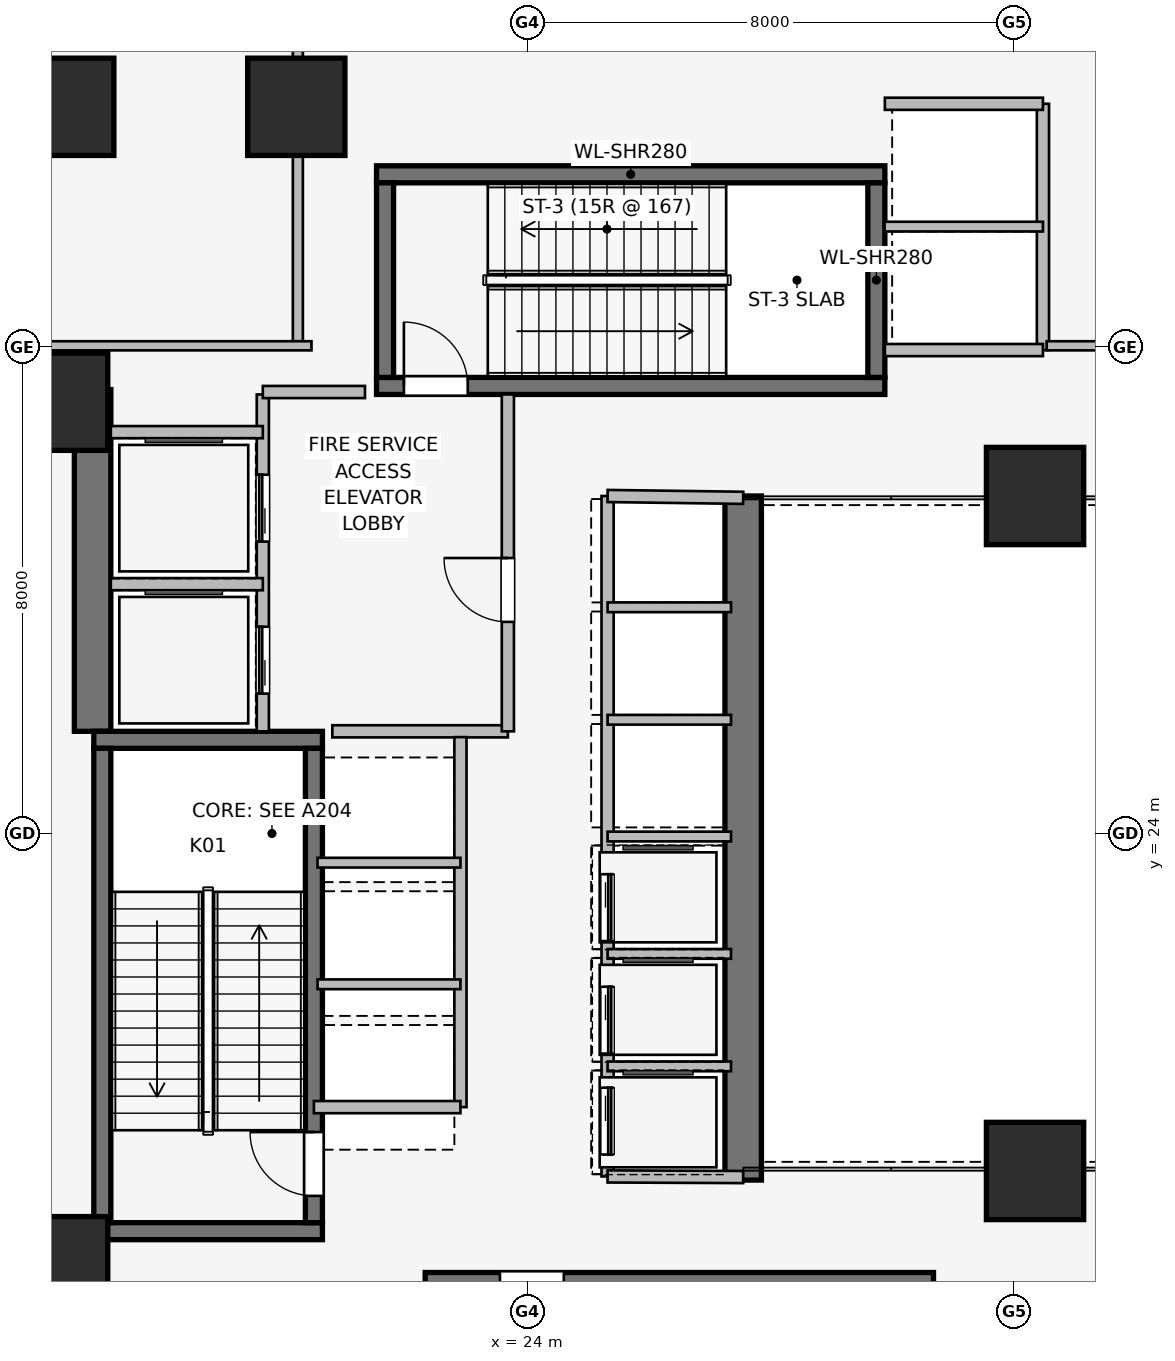
"""IFC4 building model, lengths in metres.
Left out: names, types, materials, properties, quantities, classifications, styles, units other than length and angle.
Written with IfcOpenShell. Run it as: python <this file> out.ifc"""

import sys

from ifc_helpers import new_model, si_unit, direction, frame, frame_2d, origin, origin_2d, place, context, subcontext, project, spatial, rectangle, extrude, element, fill, save


model = new_model("IFC4")
c1 = context("Model", 3, precision=1e-05, world=origin(), true_north=direction((0.0, 1.0)))
c2 = subcontext(c1, "Body", "Model", "MODEL_VIEW")
j1 = project(units=[si_unit("LENGTHUNIT", "METRE"), si_unit("PLANEANGLEUNIT", "RADIAN")], contexts=[c1])
p1 = place(None, origin())
s1 = spatial("IfcSite", under=j1, at=p1, CompositionType="ELEMENT")
p2 = place(p1, origin())
s2 = spatial("IfcBuilding", under=s1, at=p2, CompositionType="ELEMENT")
p3 = place(p2, frame((0.0, 0.0, 6.0)))
s3 = spatial("IfcBuildingStorey", under=s2, at=p3, CompositionType="ELEMENT", Elevation=6.0)
p4 = place(p3, frame((16.85, 25.68, 0.0), z_axis=(0.0, 0.0, 1.0), x_axis=(0.0, 1.0, 0.0)))
e1 = element("IfcWall", 1, at=p4, inside=s3, PredefinedType="SHEAR", context=c2, shape_type="SweptSolid", body=[
    extrude(rectangle(XDim=5.62, YDim=0.6, at=frame_2d((2.81, 0.0))), origin(), (0.0, 0.0, 1.0), 5.0),
])
p5 = place(p3, frame((27.55, 29.55, 0.0), z_axis=(0.0, 0.0, 1.0), x_axis=(0.0, -1.0, 0.0)))
e2 = element("IfcWall", 2, at=p5, inside=s3, PredefinedType="SHEAR", context=c2, shape_type="SweptSolid", body=[
    extrude(rectangle(XDim=11.25, YDim=0.6, at=frame_2d((5.625, 0.0))), origin(), (0.0, 0.0, 1.0), 5.0),
])
for number, where, z_axis, x_axis in (
    (3, (16.87, 17.46, 0.0), (0.0, 0.0, 1.0), (1.0, 0.0, 0.0)),
    (4, (20.63, 25.54, 0.0), (0.0, 0.0, 1.0), (-1.0, 0.0, 0.0)),
):
    element("IfcWall", number, at=place(p3, frame(where, z_axis=z_axis, x_axis=x_axis)), inside=s3, PredefinedType="SHEAR", context=c2, shape_type="SweptSolid", body=[
        extrude(rectangle(XDim=3.76, YDim=0.28, at=frame_2d((1.88, 0.0))), origin(), (0.0, 0.0, 1.0), 5.0),
    ])
p6 = place(p3, frame((17.01, 25.4, 0.0), z_axis=(0.0, 0.0, 1.0), x_axis=(0.0, -1.0, 0.0)))
e5 = element("IfcWall", 5, at=p6, inside=s3, PredefinedType="SHEAR", context=c2, shape_type="SweptSolid", body=[
    extrude(rectangle(XDim=7.8, YDim=0.28, at=frame_2d((3.9, 0.0))), origin(), (0.0, 0.0, 1.0), 5.0),
])
p7 = place(p3, frame((20.49, 17.6, 0.0), z_axis=(0.0, 0.0, 1.0), x_axis=(0.0, 1.0, 0.0)))
e6 = element("IfcWall", 6, at=p7, inside=s3, PredefinedType="SHEAR", context=c2, shape_type="SweptSolid", body=[
    extrude(rectangle(XDim=7.8, YDim=0.28, at=frame_2d((3.9, 0.0))), origin(), (0.0, 0.0, 1.0), 5.0),
])
p8 = place(p7, frame((0.44, 0.0, 0.0)))
e7 = element("IfcOpeningElement", 7, at=p8, cuts=e6, PredefinedType="OPENING", context=c2, shape_type="SweptSolid", body=[
    extrude(rectangle(XDim=1.05, YDim=2.0, at=frame_2d((0.525, 1.0))), frame((0.0, 0.15, 0.0), z_axis=(0.0, -1.0, 0.0), x_axis=(1.0, 0.0, 0.0)), (0.0, 0.0, 1.0), 0.3),
])
p9 = place(p3, frame((30.68, 16.64, 0.0), z_axis=(0.0, 0.0, 1.0), x_axis=(-1.0, 0.0, 0.0)))
e8 = element("IfcWall", 8, at=p9, inside=s3, PredefinedType="SHEAR", context=c2, shape_type="SweptSolid", body=[
    extrude(rectangle(XDim=8.36, YDim=0.28, at=frame_2d((4.18, 0.0))), origin(), (0.0, 0.0, 1.0), 5.0),
])
p10 = place(p9, frame((6.08, 0.0, 0.0)))
e9 = element("IfcOpeningElement", 9, at=p10, cuts=e8, PredefinedType="OPENING", context=c2, shape_type="SweptSolid", body=[
    extrude(rectangle(XDim=1.05, YDim=2.0, at=frame_2d((0.525, 1.0))), frame((0.0, 0.15, 0.0), z_axis=(0.0, -1.0, 0.0), x_axis=(1.0, 0.0, 0.0)), (0.0, 0.0, 1.0), 0.3),
])
p11 = place(p3, frame((21.52, 31.36, 0.0), z_axis=(0.0, 0.0, 1.0), x_axis=(1.0, 0.0, 0.0)))
e10 = element("IfcWall", 10, at=p11, inside=s3, PredefinedType="SHEAR", context=c2, shape_type="SweptSolid", body=[
    extrude(rectangle(XDim=8.36, YDim=0.28, at=frame_2d((4.18, 0.0))), origin(), (0.0, 0.0, 1.0), 5.0),
])
p12 = place(p11, frame((0.45, 0.0, 0.0)))
e11 = element("IfcOpeningElement", 11, at=p12, cuts=e10, PredefinedType="OPENING", context=c2, shape_type="SweptSolid", body=[
    extrude(rectangle(XDim=1.05, YDim=2.0, at=frame_2d((0.525, 1.0))), frame((0.0, 0.15, 0.0), z_axis=(0.0, -1.0, 0.0), x_axis=(1.0, 0.0, 0.0)), (0.0, 0.0, 1.0), 0.3),
])
p13 = place(p3, frame((29.88, 34.84, 0.0), z_axis=(0.0, 0.0, 1.0), x_axis=(-1.0, 0.0, 0.0)))
e12 = element("IfcWall", 12, at=p13, inside=s3, PredefinedType="SHEAR", context=c2, shape_type="SweptSolid", body=[
    extrude(rectangle(XDim=8.36, YDim=0.28, at=frame_2d((4.18, 0.0))), origin(), (0.0, 0.0, 1.0), 5.0),
])
for number, where, z_axis, x_axis in (
    (13, (21.66, 34.7, 0.0), (0.0, 0.0, 1.0), (0.0, -1.0, 0.0)),
    (14, (29.74, 31.5, 0.0), (0.0, 0.0, 1.0), (0.0, 1.0, 0.0)),
):
    element("IfcWall", number, at=place(p3, frame(where, z_axis=z_axis, x_axis=x_axis)), inside=s3, PredefinedType="SHEAR", context=c2, shape_type="SweptSolid", body=[
        extrude(rectangle(XDim=3.2, YDim=0.28, at=frame_2d((1.6, 0.0))), origin(), (0.0, 0.0, 1.0), 5.0),
    ])
for number, where, z_axis, x_axis in (
    (15, (16.3, 16.9, 0.0), (0.0, 0.0, 1.0), (1.0, 0.0, 0.0)),
    (16, (16.3, 31.1, 0.0), (0.0, 0.0, 1.0), (1.0, 0.0, 0.0)),
    (17, (32.35, 18.45, 0.0), (0.0, 0.0, 1.0), (1.0, 0.0, 0.0)),
    (18, (32.35, 29.55, 0.0), (0.0, 0.0, 1.0), (1.0, 0.0, 0.0)),
    (19, (20.2, 35.95, 0.0), (0.0, 0.0, 1.0), (1.0, 0.0, 0.0)),
    (20, (16.4, 35.95, 0.0), (0.0, 0.0, 1.0), (1.0, 0.0, 0.0)),
):
    element("IfcColumn", number, at=place(p3, frame(where, z_axis=z_axis, x_axis=x_axis)), inside=s3, PredefinedType="COLUMN", context=c2, shape_type="SweptSolid", body=[
        extrude(rectangle(XDim=1.6, YDim=1.6, at=origin_2d()), origin(), (0.0, 0.0, 1.0), 5.0),
    ])
p14 = place(p3, frame((19.65, 25.68, 0.0), z_axis=(0.0, 0.0, 1.0), x_axis=(0.0, 1.0, 0.0)))
e21 = element("IfcWall", 21, at=p14, inside=s3, PredefinedType="PARTITIONING", context=c2, shape_type="SweptSolid", body=[
    extrude(rectangle(XDim=5.54, YDim=0.2, at=frame_2d((2.77, 0.0))), origin(), (0.0, 0.0, 1.0), 4.69),
])
p15 = place(p14, frame((0.62, 0.0, 0.0)))
e22 = element("IfcOpeningElement", 22, at=p15, cuts=e21, PredefinedType="OPENING", context=c2, shape_type="SweptSolid", body=[
    extrude(rectangle(XDim=1.1, YDim=2.2, at=frame_2d((0.55, 1.1))), frame((0.0, 0.11, 0.0), z_axis=(0.0, -1.0, 0.0), x_axis=(1.0, 0.0, 0.0)), (0.0, 0.0, 1.0), 0.22),
])
p16 = place(p14, frame((3.12, 0.0, 0.0)))
e23 = element("IfcOpeningElement", 23, at=p16, cuts=e21, PredefinedType="OPENING", context=c2, shape_type="SweptSolid", body=[
    extrude(rectangle(XDim=1.1, YDim=2.2, at=frame_2d((0.55, 1.1))), frame((0.0, 0.11, 0.0), z_axis=(0.0, -1.0, 0.0), x_axis=(1.0, 0.0, 0.0)), (0.0, 0.0, 1.0), 0.22),
])
p17 = place(p3, frame((20.793, 25.68, 0.0), z_axis=(0.0, 0.0, 1.0), x_axis=(1.0, 0.0, 0.0)))
e24 = element("IfcWall", 24, at=p17, inside=s3, PredefinedType="PARTITIONING", context=c2, shape_type="SweptSolid", body=[
    extrude(rectangle(XDim=2.887, YDim=0.2, at=frame_2d((1.443, 0.0))), origin(), (0.0, 0.0, 1.0), 4.69),
])
p18 = place(p3, frame((23.68, 25.68, 0.0), z_axis=(0.0, 0.0, 1.0), x_axis=(0.0, 1.0, 0.0)))
e25 = element("IfcWall", 25, at=p18, inside=s3, PredefinedType="PARTITIONING", context=c2, shape_type="SweptSolid", body=[
    extrude(rectangle(XDim=5.54, YDim=0.2, at=frame_2d((2.77, 0.0))), origin(), (0.0, 0.0, 1.0), 4.69),
])
p19 = place(p18, frame((1.8, 0.0, 0.0)))
e26 = element("IfcOpeningElement", 26, at=p19, cuts=e25, PredefinedType="OPENING", context=c2, shape_type="SweptSolid", body=[
    extrude(rectangle(XDim=1.05, YDim=2.0, at=frame_2d((0.525, 1.0))), frame((0.0, 0.11, 0.0), z_axis=(0.0, -1.0, 0.0), x_axis=(1.0, 0.0, 0.0)), (0.0, 0.0, 1.0), 0.22),
])
p20 = place(p3, frame((21.33, 31.26, 0.0), z_axis=(0.0, 0.0, 1.0), x_axis=(-1.0, 0.0, 0.0)))
e27 = element("IfcWall", 27, at=p20, inside=s3, PredefinedType="PARTITIONING", context=c2, shape_type="SweptSolid", body=[
    extrude(rectangle(XDim=1.68, YDim=0.2, at=frame_2d((0.84, 0.0))), origin(), (0.0, 0.0, 1.0), 4.69),
])
p21 = place(p3, frame((17.15, 28.1, 0.0), z_axis=(0.0, 0.0, 1.0), x_axis=(1.0, 0.0, 0.0)))
e28 = element("IfcWall", 28, at=p21, inside=s3, PredefinedType="PARTITIONING", context=c2, shape_type="SweptSolid", body=[
    extrude(rectangle(XDim=2.5, YDim=0.2, at=frame_2d((1.25, 0.0))), origin(), (0.0, 0.0, 1.0), 4.69),
])
p22 = place(p3, frame((19.65, 30.6, 0.0), z_axis=(0.0, 0.0, 1.0), x_axis=(-1.0, 0.0, 0.0)))
e29 = element("IfcWall", 29, at=p22, inside=s3, PredefinedType="PARTITIONING", context=c2, shape_type="SweptSolid", body=[
    extrude(rectangle(XDim=2.5, YDim=0.2, at=frame_2d((1.25, 0.0))), origin(), (0.0, 0.0, 1.0), 3.59),
])
p23 = place(p3, frame((32.48, 31.95, 0.0), z_axis=(0.0, 0.0, 1.0), x_axis=(0.0, 1.0, 0.0)))
e30 = element("IfcWall", 30, at=p23, inside=s3, PredefinedType="PARTITIONING", context=c2, shape_type="SweptSolid", body=[
    extrude(rectangle(XDim=4.05, YDim=0.2, at=frame_2d((2.025, 0.0))), origin(), (0.0, 0.0, 1.0), 4.69),
])
p24 = place(p3, frame((29.88, 36.0, 0.0), z_axis=(0.0, 0.0, 1.0), x_axis=(1.0, 0.0, 0.0)))
e31 = element("IfcWall", 31, at=p24, inside=s3, PredefinedType="PARTITIONING", context=c2, shape_type="SweptSolid", body=[
    extrude(rectangle(XDim=2.6, YDim=0.2, at=frame_2d((1.3, 0.0))), origin(), (0.0, 0.0, 1.0), 3.742),
])
p25 = place(p3, frame((32.48, 31.95, 0.0), z_axis=(0.0, 0.0, 1.0), x_axis=(-1.0, 0.0, 0.0)))
e32 = element("IfcWall", 32, at=p25, inside=s3, PredefinedType="PARTITIONING", context=c2, shape_type="SweptSolid", body=[
    extrude(rectangle(XDim=2.6, YDim=0.2, at=frame_2d((1.3, 0.0))), origin(), (0.0, 0.0, 1.0), 4.69),
])
p26 = place(p3, frame((29.875, 33.98, 0.0), z_axis=(0.0, 0.0, 1.0), x_axis=(1.0, 0.0, 0.0)))
e33 = element("IfcWall", 33, at=p26, inside=s3, PredefinedType="PARTITIONING", context=c2, shape_type="SweptSolid", body=[
    extrude(rectangle(XDim=2.605, YDim=0.16, at=frame_2d((1.302, 0.0))), origin(), (0.0, 0.0, 1.0), 4.69),
])
p27 = place(p3, frame((22.9, 19.5, 0.0), z_axis=(0.0, 0.0, 1.0), x_axis=(0.0, 1.0, 0.0)))
e34 = element("IfcWall", 34, at=p27, inside=s3, PredefinedType="PARTITIONING", context=c2, shape_type="SweptSolid", body=[
    extrude(rectangle(XDim=6.085, YDim=0.2, at=frame_2d((3.042, 0.0))), origin(), (0.0, 0.0, 1.0), 4.69),
])
p28 = place(p3, frame((20.49, 19.5, 0.0), z_axis=(0.0, 0.0, 1.0), x_axis=(1.0, 0.0, 0.0)))
e35 = element("IfcWall", 35, at=p28, inside=s3, PredefinedType="PARTITIONING", context=c2, shape_type="SweptSolid", body=[
    extrude(rectangle(XDim=2.41, YDim=0.2, at=frame_2d((1.205, 0.0))), origin(), (0.0, 0.0, 1.0), 3.59),
])
for number, where, z_axis, x_axis in (
    (36, (20.55, 21.52, 0.0), (0.0, 0.0, 1.0), (1.0, 0.0, 0.0)),
    (37, (20.55, 23.52, 0.0), (0.0, 0.0, 1.0), (1.0, 0.0, 0.0)),
):
    element("IfcWall", number, at=place(p3, frame(where, z_axis=z_axis, x_axis=x_axis)), inside=s3, PredefinedType="PARTITIONING", context=c2, shape_type="SweptSolid", body=[
        extrude(rectangle(XDim=2.35, YDim=0.16, at=frame_2d((1.175, 0.0))), origin(), (0.0, 0.0, 1.0), 4.69),
    ])
p29 = place(p3, frame((25.32, 29.55, 0.0), z_axis=(0.0, 0.0, 1.0), x_axis=(0.0, -1.0, 0.0)))
e38 = element("IfcWall", 38, at=p29, inside=s3, PredefinedType="PARTITIONING", context=c2, shape_type="SweptSolid", body=[
    extrude(rectangle(XDim=11.19, YDim=0.2, at=frame_2d((5.595, 0.0))), origin(), (0.0, 0.0, 1.0), 4.69),
])
p30 = place(p29, frame((6.22, 0.0, 0.0)))
e39 = element("IfcOpeningElement", 39, at=p30, cuts=e38, PredefinedType="OPENING", context=c2, shape_type="SweptSolid", body=[
    extrude(rectangle(XDim=1.1, YDim=2.2, at=frame_2d((0.55, 1.1))), frame((0.0, 0.11, 0.0), z_axis=(0.0, -1.0, 0.0), x_axis=(1.0, 0.0, 0.0)), (0.0, 0.0, 1.0), 0.22),
])
p31 = place(p29, frame((8.07, 0.0, 0.0)))
e40 = element("IfcOpeningElement", 40, at=p31, cuts=e38, PredefinedType="OPENING", context=c2, shape_type="SweptSolid", body=[
    extrude(rectangle(XDim=1.1, YDim=2.2, at=frame_2d((0.55, 1.1))), frame((0.0, 0.11, 0.0), z_axis=(0.0, -1.0, 0.0), x_axis=(1.0, 0.0, 0.0)), (0.0, 0.0, 1.0), 0.22),
])
p32 = place(p29, frame((9.73, 0.0, 0.0)))
e41 = element("IfcOpeningElement", 41, at=p32, cuts=e38, PredefinedType="OPENING", context=c2, shape_type="SweptSolid", body=[
    extrude(rectangle(XDim=1.1, YDim=2.2, at=frame_2d((0.55, 1.1))), frame((0.0, 0.11, 0.0), z_axis=(0.0, -1.0, 0.0), x_axis=(1.0, 0.0, 0.0)), (0.0, 0.0, 1.0), 0.22),
])
p33 = place(p3, frame((25.32, 18.36, 0.0), z_axis=(0.0, 0.0, 1.0), x_axis=(0.999989925833, -0.004488678231, 0.0)))
e42 = element("IfcWall", 42, at=p33, inside=s3, PredefinedType="PARTITIONING", context=c2, shape_type="SweptSolid", body=[
    extrude(rectangle(XDim=2.23, YDim=0.2, at=frame_2d((1.115, 0.0))), origin(), (0.0, 0.0, 1.0), 4.69),
])
p34 = place(p3, frame((27.55, 29.52, 0.0), z_axis=(0.0, 0.0, 1.0), x_axis=(-0.999909343457, 0.013464949556, 0.0)))
e43 = element("IfcWall", 43, at=p34, inside=s3, PredefinedType="PARTITIONING", context=c2, shape_type="SweptSolid", body=[
    extrude(rectangle(XDim=2.23, YDim=0.2, at=frame_2d((1.115, 0.0))), origin(), (0.0, 0.0, 1.0), 3.59),
])
for number, where, z_axis, x_axis in (
    (44, (25.32, 20.17, 0.0), (0.0, 0.0, 1.0), (1.0, 0.0, 0.0)),
    (45, (25.32, 22.02, 0.0), (0.0, 0.0, 1.0), (1.0, 0.0, 0.0)),
    (46, (25.32, 23.95, 0.0), (0.0, 0.0, 1.0), (1.0, 0.0, 0.0)),
    (47, (25.32, 25.87, 0.0), (0.0, 0.0, 1.0), (1.0, 0.0, 0.0)),
    (48, (25.32, 27.72, 0.0), (0.0, 0.0, 1.0), (1.0, 0.0, 0.0)),
):
    element("IfcWall", number, at=place(p3, frame(where, z_axis=z_axis, x_axis=x_axis)), inside=s3, PredefinedType="PARTITIONING", context=c2, shape_type="SweptSolid", body=[
        extrude(rectangle(XDim=2.03, YDim=0.16, at=frame_2d((1.015, 0.0))), origin(), (0.0, 0.0, 1.0), 4.69),
    ])
p35 = place(p3, frame((20.226, 32.09, 0.0), z_axis=(0.0, 0.0, 1.0), x_axis=(0.0, 1.0, 0.0)))
e49 = element("IfcWall", 49, at=p35, inside=s3, PredefinedType="PARTITIONING", context=c2, shape_type="SweptSolid", body=[
    extrude(rectangle(XDim=15.64, YDim=0.165, at=frame_2d((7.82, 0.0))), origin(), (0.0, 0.0, 1.0), 4.69),
])
p36 = place(p3, frame((20.45, 32.02, 0.0), z_axis=(0.0, 0.0, 1.0), x_axis=(-1.0, 0.0, 0.0)))
e50 = element("IfcWall", 50, at=p36, inside=s3, PredefinedType="PARTITIONING", context=c2, shape_type="SweptSolid", body=[
    extrude(rectangle(XDim=20.055, YDim=0.15, at=frame_2d((10.027, 0.0))), origin(), (0.0, 0.0, 1.0), 3.742),
])
p37 = place(p36, frame((9.5, 0.0, 0.0)))
e51 = element("IfcOpeningElement", 51, at=p37, cuts=e50, PredefinedType="OPENING", context=c2, shape_type="SweptSolid", body=[
    extrude(rectangle(XDim=0.96, YDim=2.0, at=frame_2d((0.48, 1.0))), frame((0.0, 0.085, 0.0), z_axis=(0.0, -1.0, 0.0), x_axis=(1.0, 0.0, 0.0)), (0.0, 0.0, 1.0), 0.17),
])
p38 = place(p3, frame((40.187, 32.02, 0.0), z_axis=(0.0, 0.0, 1.0), x_axis=(-1.0, 0.0, 0.0)))
e52 = element("IfcWall", 52, at=p38, inside=s3, PredefinedType="PARTITIONING", context=c2, shape_type="SweptSolid", body=[
    extrude(rectangle(XDim=7.646, YDim=0.15, at=frame_2d((3.823, 0.0))), origin(), (0.0, 0.0, 1.0), 4.69),
])
p39 = place(p38, frame((3.343, 0.0, 0.0)))
e53 = element("IfcOpeningElement", 53, at=p39, cuts=e52, PredefinedType="OPENING", context=c2, shape_type="SweptSolid", body=[
    extrude(rectangle(XDim=0.96, YDim=2.0, at=frame_2d((0.48, 1.0))), frame((0.0, 0.085, 0.0), z_axis=(0.0, -1.0, 0.0), x_axis=(1.0, 0.0, 0.0)), (0.0, 0.0, 1.0), 0.17),
])
p40 = place(p8, origin())
e54 = element("IfcDoor", 54, at=p40, inside=s3, OperationType="SINGLE_SWING_RIGHT", PredefinedType="DOOR", context=c2, shape_type="SweptSolid", body=[
    extrude(rectangle(XDim=1.05, YDim=2.0, at=frame_2d((0.525, 1.0))), frame((0.0, 0.025, 0.0), z_axis=(0.0, -1.0, 0.0), x_axis=(1.0, 0.0, 0.0)), (0.0, 0.0, 1.0), 0.05),
])
fill(e7, e54)
p41 = place(p10, origin())
e55 = element("IfcDoor", 55, at=p41, inside=s3, OperationType="SINGLE_SWING_RIGHT", PredefinedType="DOOR", context=c2, shape_type="SweptSolid", body=[
    extrude(rectangle(XDim=1.05, YDim=2.0, at=frame_2d((0.525, 1.0))), frame((0.0, 0.025, 0.0), z_axis=(0.0, -1.0, 0.0), x_axis=(1.0, 0.0, 0.0)), (0.0, 0.0, 1.0), 0.05),
])
fill(e9, e55)
p42 = place(p12, origin())
e56 = element("IfcDoor", 56, at=p42, inside=s3, OperationType="SINGLE_SWING_LEFT", PredefinedType="DOOR", context=c2, shape_type="SweptSolid", body=[
    extrude(rectangle(XDim=1.05, YDim=2.0, at=frame_2d((0.525, 1.0))), frame((0.0, 0.025, 0.0), z_axis=(0.0, -1.0, 0.0), x_axis=(1.0, 0.0, 0.0)), (0.0, 0.0, 1.0), 0.05),
])
fill(e11, e56)
p43 = place(p15, origin())
e57 = element("IfcDoor", 57, at=p43, inside=s3, OperationType="SLIDING_TO_LEFT", PredefinedType="DOOR", context=c2, shape_type="SweptSolid", body=[
    extrude(rectangle(XDim=1.1, YDim=2.2, at=frame_2d((0.55, 1.1))), frame((0.0, 0.025, 0.0), z_axis=(0.0, -1.0, 0.0), x_axis=(1.0, 0.0, 0.0)), (0.0, 0.0, 1.0), 0.05),
])
fill(e22, e57)
p44 = place(p16, origin())
e58 = element("IfcDoor", 58, at=p44, inside=s3, OperationType="SLIDING_TO_LEFT", PredefinedType="DOOR", context=c2, shape_type="SweptSolid", body=[
    extrude(rectangle(XDim=1.1, YDim=2.2, at=frame_2d((0.55, 1.1))), frame((0.0, 0.025, 0.0), z_axis=(0.0, -1.0, 0.0), x_axis=(1.0, 0.0, 0.0)), (0.0, 0.0, 1.0), 0.05),
])
fill(e23, e58)
p45 = place(p19, origin())
e59 = element("IfcDoor", 59, at=p45, inside=s3, OperationType="SINGLE_SWING_RIGHT", PredefinedType="DOOR", context=c2, shape_type="SweptSolid", body=[
    extrude(rectangle(XDim=1.05, YDim=2.0, at=frame_2d((0.525, 1.0))), frame((0.0, 0.025, 0.0), z_axis=(0.0, -1.0, 0.0), x_axis=(1.0, 0.0, 0.0)), (0.0, 0.0, 1.0), 0.05),
])
fill(e26, e59)
p46 = place(p30, origin())
e60 = element("IfcDoor", 60, at=p46, inside=s3, OperationType="SLIDING_TO_LEFT", PredefinedType="DOOR", context=c2, shape_type="SweptSolid", body=[
    extrude(rectangle(XDim=1.1, YDim=2.2, at=frame_2d((0.55, 1.1))), frame((0.0, 0.025, 0.0), z_axis=(0.0, -1.0, 0.0), x_axis=(1.0, 0.0, 0.0)), (0.0, 0.0, 1.0), 0.05),
])
fill(e39, e60)
p47 = place(p31, origin())
e61 = element("IfcDoor", 61, at=p47, inside=s3, OperationType="SLIDING_TO_LEFT", PredefinedType="DOOR", context=c2, shape_type="SweptSolid", body=[
    extrude(rectangle(XDim=1.1, YDim=2.2, at=frame_2d((0.55, 1.1))), frame((0.0, 0.025, 0.0), z_axis=(0.0, -1.0, 0.0), x_axis=(1.0, 0.0, 0.0)), (0.0, 0.0, 1.0), 0.05),
])
fill(e40, e61)
p48 = place(p32, origin())
e62 = element("IfcDoor", 62, at=p48, inside=s3, OperationType="SLIDING_TO_LEFT", PredefinedType="DOOR", context=c2, shape_type="SweptSolid", body=[
    extrude(rectangle(XDim=1.1, YDim=2.2, at=frame_2d((0.55, 1.1))), frame((0.0, 0.025, 0.0), z_axis=(0.0, -1.0, 0.0), x_axis=(1.0, 0.0, 0.0)), (0.0, 0.0, 1.0), 0.05),
])
fill(e41, e62)
save(model, sys.argv[1])
